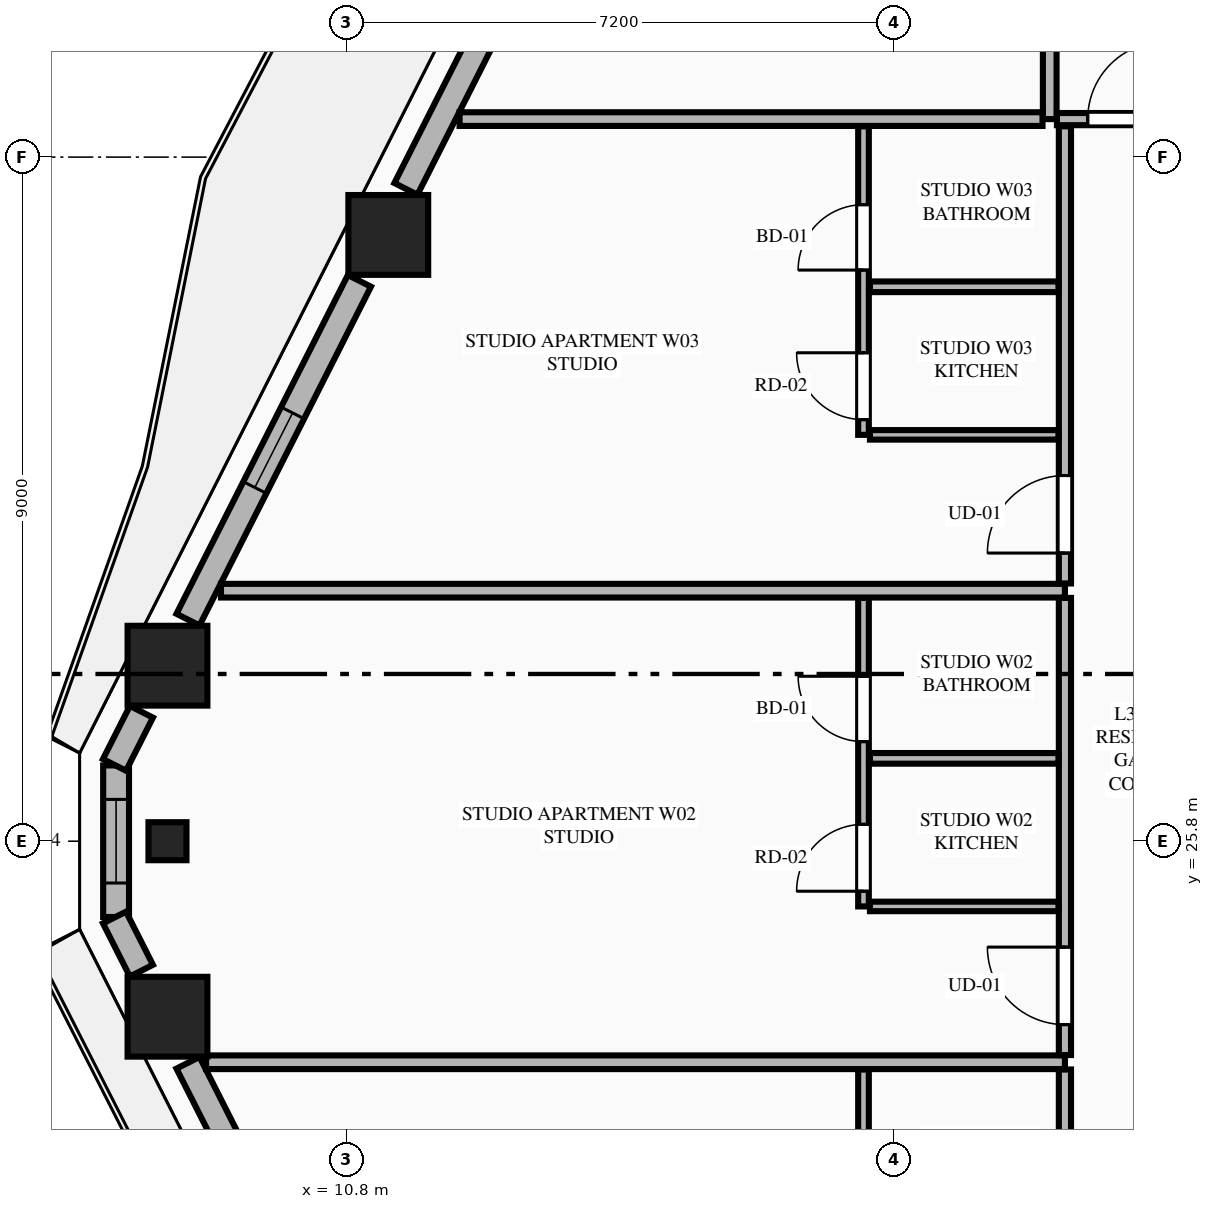
"""IFC4 building model, lengths in metres.
Left out: names, types, materials, properties, quantities, classifications, styles, units other than length and angle.
Written with IfcOpenShell. Run it as: python <this file> out.ifc"""

import sys

from ifc_helpers import new_model, si_unit, direction, frame, frame_2d, origin, origin_2d, place, context, subcontext, project, spatial, rectangle, extrude, element, fill, save


model = new_model("IFC4")
c1 = context("Model", 3, precision=1e-05, world=origin(), true_north=direction((0.0, 1.0)))
c2 = subcontext(c1, "Body", "Model", "MODEL_VIEW")
j1 = project(units=[si_unit("LENGTHUNIT", "METRE"), si_unit("PLANEANGLEUNIT", "RADIAN")], contexts=[c1])
p1 = place(None, origin())
s1 = spatial("IfcSite", under=j1, at=p1, CompositionType="ELEMENT")
p2 = place(p1, origin())
s2 = spatial("IfcBuilding", under=s1, at=p2, CompositionType="ELEMENT")
p3 = place(p2, frame((0.0, 0.0, 123.25)))
s3 = spatial("IfcBuildingStorey", under=s2, at=p3, CompositionType="ELEMENT", Elevation=123.25)
for number, where, z_axis, x_axis in (
    (1, (11.348, 33.776, 0.0), (0.0, 0.0, 1.0), (1.0, 0.0, 0.0)),
    (2, (8.443, 28.109, 0.0), (0.0, 0.0, 1.0), (1.0, 0.0, 0.0)),
    (3, (8.443, 23.491, 0.0), (0.0, 0.0, 1.0), (1.0, 0.0, 0.0)),
):
    element("IfcColumn", number, at=place(p3, frame(where, z_axis=z_axis, x_axis=x_axis)), inside=s3, PredefinedType="COLUMN", context=c2, shape_type="SweptSolid", body=[
        extrude(rectangle(XDim=1.05, YDim=1.05, at=origin_2d()), origin(), (0.0, 0.0, 1.0), 3.55),
    ])
p4 = place(p3, frame((8.443, 25.8, 0.0), z_axis=(0.0, 0.0, 1.0), x_axis=(0.0, -1.0, 0.0)))
e4 = element("IfcColumn", 4, at=p4, inside=s3, PredefinedType="PILASTER", context=c2, shape_type="SweptSolid", body=[
    extrude(rectangle(XDim=0.5, YDim=0.35, at=origin_2d()), origin(), (0.0, 0.0, 1.0), 3.55),
])
p5 = place(p3, frame((7.767, 26.797, 0.0), z_axis=(0.0, 0.0, 1.0), x_axis=(0.0, -1.0, 0.0)))
e5 = element("IfcWall", 5, at=p5, inside=s3, PredefinedType="STANDARD", context=c2, shape_type="SweptSolid", body=[
    extrude(rectangle(XDim=1.994, YDim=0.34, at=frame_2d((0.997, 0.0))), origin(), (0.0, 0.0, 1.0), 3.34),
])
p6 = place(p5, frame((0.447, 0.0, 0.75)))
e6 = element("IfcOpeningElement", 6, at=p6, cuts=e5, PredefinedType="OPENING", context=c2, shape_type="SweptSolid", body=[
    extrude(rectangle(XDim=1.1, YDim=2.0, at=frame_2d((0.55, 1.0))), frame((0.0, 0.18, 0.0), z_axis=(0.0, -1.0, 0.0), x_axis=(1.0, 0.0, 0.0)), (0.0, 0.0, 1.0), 0.36),
])
p7 = place(p3, frame((13.937, 39.039, 0.0), z_axis=(0.0, 0.0, 1.0), x_axis=(-0.451567731634, -0.892236842855, 0.0)))
e7 = element("IfcWall", 7, at=p7, inside=s3, PredefinedType="STANDARD", context=c2, shape_type="SweptSolid", body=[
    extrude(rectangle(XDim=5.219, YDim=0.34, at=frame_2d((2.61, 0.0))), origin(), (0.0, 0.0, 1.0), 2.797),
])
p8 = place(p7, frame((1.42, 0.0, 0.0)))
e8 = element("IfcOpeningElement", 8, at=p8, cuts=e7, PredefinedType="OPENING", context=c2, shape_type="SweptSolid", body=[
    extrude(rectangle(XDim=1.1, YDim=2.25, at=frame_2d((0.55, 1.125))), frame((0.0, 0.18, 0.0), z_axis=(0.0, -1.0, 0.0), x_axis=(1.0, 0.0, 0.0)), (0.0, 0.0, 1.0), 0.36),
])
p9 = place(p3, frame((10.968, 33.172, 0.0), z_axis=(0.0, 0.0, 1.0), x_axis=(-0.451470533039, -0.892286029139, 0.0)))
e9 = element("IfcWall", 9, at=p9, inside=s3, PredefinedType="STANDARD", context=c2, shape_type="SweptSolid", body=[
    extrude(rectangle(XDim=4.995, YDim=0.34, at=frame_2d((2.498, 0.0))), origin(), (0.0, 0.0, 1.0), 2.797),
])
p10 = place(p9, frame((1.947, 0.0, 0.75)))
e10 = element("IfcOpeningElement", 10, at=p10, cuts=e9, PredefinedType="OPENING", context=c2, shape_type="SweptSolid", body=[
    extrude(rectangle(XDim=1.1, YDim=1.897, at=frame_2d((0.55, 0.948))), frame((0.0, 0.18, 0.0), z_axis=(0.0, -1.0, 0.0), x_axis=(1.0, 0.0, 0.0)), (0.0, 0.0, 1.0), 0.36),
])
for number, where, z_axis, x_axis in (
    (11, (8.1, 27.503, 0.0), (0.0, 0.0, 1.0), (-0.452, -0.892, 0.0)),
    (12, (7.746, 24.796, 0.0), (0.0, 0.0, 1.0), (0.452, -0.892, 0.0)),
):
    element("IfcWall", number, at=place(p3, frame(where, z_axis=z_axis, x_axis=x_axis)), inside=s3, PredefinedType="STANDARD", context=c2, shape_type="SweptSolid", body=[
        extrude(rectangle(XDim=0.783, YDim=0.34, at=frame_2d((0.392, 0.0))), origin(), (0.0, 0.0, 1.0), 3.34),
    ])
p11 = place(p3, frame((8.713, 22.885, 0.0), z_axis=(0.0, 0.0, 1.0), x_axis=(0.451470533039, -0.892286029139, 0.0)))
e13 = element("IfcWall", 13, at=p11, inside=s3, PredefinedType="STANDARD", context=c2, shape_type="SweptSolid", body=[
    extrude(rectangle(XDim=4.995, YDim=0.34, at=frame_2d((2.498, 0.0))), origin(), (0.0, 0.0, 1.0), 2.797),
])
p12 = place(p11, frame((1.947, 0.0, 0.75)))
e14 = element("IfcOpeningElement", 14, at=p12, cuts=e13, PredefinedType="OPENING", context=c2, shape_type="SweptSolid", body=[
    extrude(rectangle(XDim=1.1, YDim=1.897, at=frame_2d((0.55, 0.948))), frame((0.0, 0.18, 0.0), z_axis=(0.0, -1.0, 0.0), x_axis=(1.0, 0.0, 0.0)), (0.0, 0.0, 1.0), 0.36),
])
p13 = place(p3, frame((20.05, 35.3, 0.0), z_axis=(0.0, 0.0, 1.0), x_axis=(0.0, 1.0, 0.0)))
e15 = element("IfcWall", 15, at=p13, inside=s3, PredefinedType="PARTITIONING", context=c2, shape_type="SweptSolid", body=[
    extrude(rectangle(XDim=12.195, YDim=0.18, at=frame_2d((6.098, 0.0))), origin(), (0.0, 0.0, 1.0), 3.34),
])
p14 = place(p3, frame((20.145, 35.3, 0.0), z_axis=(0.0, 0.0, 1.0), x_axis=(1.0, 0.0, 0.0)))
e16 = element("IfcWall", 16, at=p14, inside=s3, PredefinedType="PARTITIONING", context=c2, shape_type="SweptSolid", body=[
    extrude(rectangle(XDim=24.51, YDim=0.16, at=frame_2d((12.255, 0.0))), origin(), (0.0, 0.0, 1.0), 3.34),
])
p15 = place(p14, frame((0.405, 0.0, 0.0)))
e17 = element("IfcOpeningElement", 17, at=p15, cuts=e16, PredefinedType="OPENING", context=c2, shape_type="SweptSolid", body=[
    extrude(rectangle(XDim=1.02, YDim=2.25, at=frame_2d((0.51, 1.125))), frame((0.0, 0.09, 0.0), z_axis=(0.0, -1.0, 0.0), x_axis=(1.0, 0.0, 0.0)), (0.0, 0.0, 1.0), 0.18),
])
p16 = place(p3, frame((12.286, 35.3, 0.0), z_axis=(0.0, 0.0, 1.0), x_axis=(1.0, 0.0, 0.0)))
e18 = element("IfcWall", 18, at=p16, inside=s3, PredefinedType="PARTITIONING", context=c2, shape_type="SweptSolid", body=[
    extrude(rectangle(XDim=7.669, YDim=0.18, at=frame_2d((3.834, 0.0))), origin(), (0.0, 0.0, 1.0), 3.34),
])
p17 = place(p3, frame((20.25, 16.595, 0.0), z_axis=(0.0, 0.0, 1.0), x_axis=(0.0, 1.0, 0.0)))
e19 = element("IfcWall", 19, at=p17, inside=s3, PredefinedType="PARTITIONING", context=c2, shape_type="SweptSolid", body=[
    extrude(rectangle(XDim=6.202, YDim=0.16, at=frame_2d((3.101, 0.0))), origin(), (0.0, 0.0, 1.0), 3.34),
])
p18 = place(p17, frame((0.4, 0.0, 0.0)))
e20 = element("IfcOpeningElement", 20, at=p18, cuts=e19, PredefinedType="OPENING", context=c2, shape_type="SweptSolid", body=[
    extrude(rectangle(XDim=1.02, YDim=2.25, at=frame_2d((0.51, 1.125))), frame((0.0, 0.09, 0.0), z_axis=(0.0, -1.0, 0.0), x_axis=(1.0, 0.0, 0.0)), (0.0, 0.0, 1.0), 0.18),
])
p19 = place(p3, frame((17.6, 18.55, 0.0), z_axis=(0.0, 0.0, 1.0), x_axis=(0.0, 1.0, 0.0)))
e21 = element("IfcWall", 21, at=p19, inside=s3, PredefinedType="PLUMBINGWALL", context=c2, shape_type="SweptSolid", body=[
    extrude(rectangle(XDim=4.247, YDim=0.14, at=frame_2d((2.124, 0.0))), origin(), (0.0, 0.0, 1.0), 3.34),
])
p20 = place(p19, frame((2.259, 0.0, 0.0)))
e22 = element("IfcOpeningElement", 22, at=p20, cuts=e21, PredefinedType="OPENING", context=c2, shape_type="SweptSolid", body=[
    extrude(rectangle(XDim=0.86, YDim=2.1, at=frame_2d((0.43, 1.05))), frame((0.0, 0.08, 0.0), z_axis=(0.0, -1.0, 0.0), x_axis=(1.0, 0.0, 0.0)), (0.0, 0.0, 1.0), 0.16),
])
p21 = place(p19, frame((0.2, 0.0, 0.0)))
e23 = element("IfcOpeningElement", 23, at=p21, cuts=e21, PredefinedType="OPENING", context=c2, shape_type="SweptSolid", body=[
    extrude(rectangle(XDim=0.88, YDim=2.15, at=frame_2d((0.44, 1.075))), frame((0.0, 0.08, 0.0), z_axis=(0.0, -1.0, 0.0), x_axis=(1.0, 0.0, 0.0)), (0.0, 0.0, 1.0), 0.16),
])
p22 = place(p3, frame((8.951, 22.892, 0.0), z_axis=(0.0, 0.0, 1.0), x_axis=(1.0, 0.0, 0.0)))
e24 = element("IfcWall", 24, at=p22, inside=s3, PredefinedType="PARTITIONING", context=c2, shape_type="SweptSolid", body=[
    extrude(rectangle(XDim=11.299, YDim=0.18, at=frame_2d((5.649, 0.0))), origin(), (0.0, 0.0, 1.0), 3.34),
])
p23 = place(p3, frame((20.25, 22.987, 0.0), z_axis=(0.0, 0.0, 1.0), x_axis=(0.0, 1.0, 0.0)))
e25 = element("IfcWall", 25, at=p23, inside=s3, PredefinedType="PARTITIONING", context=c2, shape_type="SweptSolid", body=[
    extrude(rectangle(XDim=6.014, YDim=0.16, at=frame_2d((3.007, 0.0))), origin(), (0.0, 0.0, 1.0), 3.34),
])
p24 = place(p23, frame((0.4, 0.0, 0.0)))
e26 = element("IfcOpeningElement", 26, at=p24, cuts=e25, PredefinedType="OPENING", context=c2, shape_type="SweptSolid", body=[
    extrude(rectangle(XDim=1.02, YDim=2.25, at=frame_2d((0.51, 1.125))), frame((0.0, 0.09, 0.0), z_axis=(0.0, -1.0, 0.0), x_axis=(1.0, 0.0, 0.0)), (0.0, 0.0, 1.0), 0.18),
])
p25 = place(p3, frame((17.685, 24.942, 0.0), z_axis=(0.0, 0.0, 1.0), x_axis=(1.0, 0.0, 0.0)))
e27 = element("IfcWall", 27, at=p25, inside=s3, PredefinedType="PARTITIONING", context=c2, shape_type="SweptSolid", body=[
    extrude(rectangle(XDim=2.48, YDim=0.125, at=frame_2d((1.24, 0.0))), origin(), (0.0, 0.0, 1.0), 3.34),
])
p26 = place(p3, frame((17.6, 24.942, 0.0), z_axis=(0.0, 0.0, 1.0), x_axis=(0.0, 1.0, 0.0)))
e28 = element("IfcWall", 28, at=p26, inside=s3, PredefinedType="PLUMBINGWALL", context=c2, shape_type="SweptSolid", body=[
    extrude(rectangle(XDim=4.059, YDim=0.14, at=frame_2d((2.03, 0.0))), origin(), (0.0, 0.0, 1.0), 3.34),
])
p27 = place(p26, frame((2.168, 0.0, 0.0)))
e29 = element("IfcOpeningElement", 29, at=p27, cuts=e28, PredefinedType="OPENING", context=c2, shape_type="SweptSolid", body=[
    extrude(rectangle(XDim=0.86, YDim=2.1, at=frame_2d((0.43, 1.05))), frame((0.0, 0.08, 0.0), z_axis=(0.0, -1.0, 0.0), x_axis=(1.0, 0.0, 0.0)), (0.0, 0.0, 1.0), 0.16),
])
p28 = place(p26, frame((0.2, 0.0, 0.0)))
e30 = element("IfcOpeningElement", 30, at=p28, cuts=e28, PredefinedType="OPENING", context=c2, shape_type="SweptSolid", body=[
    extrude(rectangle(XDim=0.88, YDim=2.15, at=frame_2d((0.44, 1.075))), frame((0.0, 0.08, 0.0), z_axis=(0.0, -1.0, 0.0), x_axis=(1.0, 0.0, 0.0)), (0.0, 0.0, 1.0), 0.16),
])
p29 = place(p3, frame((17.685, 26.89, 0.0), z_axis=(0.0, 0.0, 1.0), x_axis=(1.0, 0.0, 0.0)))
e31 = element("IfcWall", 31, at=p29, inside=s3, PredefinedType="PLUMBINGWALL", context=c2, shape_type="SweptSolid", body=[
    extrude(rectangle(XDim=2.48, YDim=0.14, at=frame_2d((1.24, 0.0))), origin(), (0.0, 0.0, 1.0), 3.34),
])
p30 = place(p3, frame((9.147, 29.096, 0.0), z_axis=(0.0, 0.0, 1.0), x_axis=(1.0, 0.0, 0.0)))
e32 = element("IfcWall", 32, at=p30, inside=s3, PredefinedType="PARTITIONING", context=c2, shape_type="SweptSolid", body=[
    extrude(rectangle(XDim=11.103, YDim=0.18, at=frame_2d((5.552, 0.0))), origin(), (0.0, 0.0, 1.0), 3.34),
])
p31 = place(p3, frame((20.25, 29.191, 0.0), z_axis=(0.0, 0.0, 1.0), x_axis=(0.0, 1.0, 0.0)))
e33 = element("IfcWall", 33, at=p31, inside=s3, PredefinedType="PARTITIONING", context=c2, shape_type="SweptSolid", body=[
    extrude(rectangle(XDim=6.014, YDim=0.16, at=frame_2d((3.007, 0.0))), origin(), (0.0, 0.0, 1.0), 3.34),
])
p32 = place(p31, frame((0.4, 0.0, 0.0)))
e34 = element("IfcOpeningElement", 34, at=p32, cuts=e33, PredefinedType="OPENING", context=c2, shape_type="SweptSolid", body=[
    extrude(rectangle(XDim=1.02, YDim=2.25, at=frame_2d((0.51, 1.125))), frame((0.0, 0.09, 0.0), z_axis=(0.0, -1.0, 0.0), x_axis=(1.0, 0.0, 0.0)), (0.0, 0.0, 1.0), 0.18),
])
p33 = place(p3, frame((17.685, 31.146, 0.0), z_axis=(0.0, 0.0, 1.0), x_axis=(1.0, 0.0, 0.0)))
e35 = element("IfcWall", 35, at=p33, inside=s3, PredefinedType="PARTITIONING", context=c2, shape_type="SweptSolid", body=[
    extrude(rectangle(XDim=2.48, YDim=0.125, at=frame_2d((1.24, 0.0))), origin(), (0.0, 0.0, 1.0), 3.34),
])
p34 = place(p3, frame((17.6, 31.146, 0.0), z_axis=(0.0, 0.0, 1.0), x_axis=(0.0, 1.0, 0.0)))
e36 = element("IfcWall", 36, at=p34, inside=s3, PredefinedType="PLUMBINGWALL", context=c2, shape_type="SweptSolid", body=[
    extrude(rectangle(XDim=4.059, YDim=0.14, at=frame_2d((2.03, 0.0))), origin(), (0.0, 0.0, 1.0), 3.34),
])
p35 = place(p34, frame((2.168, 0.0, 0.0)))
e37 = element("IfcOpeningElement", 37, at=p35, cuts=e36, PredefinedType="OPENING", context=c2, shape_type="SweptSolid", body=[
    extrude(rectangle(XDim=0.86, YDim=2.1, at=frame_2d((0.43, 1.05))), frame((0.0, 0.08, 0.0), z_axis=(0.0, -1.0, 0.0), x_axis=(1.0, 0.0, 0.0)), (0.0, 0.0, 1.0), 0.16),
])
p36 = place(p34, frame((0.2, 0.0, 0.0)))
e38 = element("IfcOpeningElement", 38, at=p36, cuts=e36, PredefinedType="OPENING", context=c2, shape_type="SweptSolid", body=[
    extrude(rectangle(XDim=0.88, YDim=2.15, at=frame_2d((0.44, 1.075))), frame((0.0, 0.08, 0.0), z_axis=(0.0, -1.0, 0.0), x_axis=(1.0, 0.0, 0.0)), (0.0, 0.0, 1.0), 0.16),
])
p37 = place(p3, frame((17.685, 33.094, 0.0), z_axis=(0.0, 0.0, 1.0), x_axis=(1.0, 0.0, 0.0)))
e39 = element("IfcWall", 39, at=p37, inside=s3, PredefinedType="PLUMBINGWALL", context=c2, shape_type="SweptSolid", body=[
    extrude(rectangle(XDim=2.48, YDim=0.14, at=frame_2d((1.24, 0.0))), origin(), (0.0, 0.0, 1.0), 3.34),
])
p38 = place(p10, origin())
e40 = element("IfcWindow", 40, at=p38, inside=s3, PartitioningType="SINGLE_PANEL", PredefinedType="WINDOW", context=c2, shape_type="SweptSolid", body=[
    extrude(rectangle(XDim=1.1, YDim=1.897, at=frame_2d((0.55, 0.948))), frame((0.0, 0.03, 0.0), z_axis=(0.0, -1.0, 0.0), x_axis=(1.0, 0.0, 0.0)), (0.0, 0.0, 1.0), 0.06),
])
fill(e10, e40)
p39 = place(p15, origin())
e41 = element("IfcDoor", 41, at=p39, inside=s3, OperationType="SINGLE_SWING_RIGHT", PredefinedType="DOOR", context=c2, shape_type="SweptSolid", body=[
    extrude(rectangle(XDim=1.02, YDim=2.25, at=frame_2d((0.51, 1.125))), frame((0.0, 0.025, 0.0), z_axis=(0.0, -1.0, 0.0), x_axis=(1.0, 0.0, 0.0)), (0.0, 0.0, 1.0), 0.05),
])
fill(e17, e41)
p40 = place(p27, origin())
e42 = element("IfcDoor", 42, at=p40, inside=s3, OperationType="SINGLE_SWING_RIGHT", PredefinedType="DOOR", context=c2, shape_type="SweptSolid", body=[
    extrude(rectangle(XDim=0.86, YDim=2.1, at=frame_2d((0.43, 1.05))), frame((0.0, 0.025, 0.0), z_axis=(0.0, -1.0, 0.0), x_axis=(1.0, 0.0, 0.0)), (0.0, 0.0, 1.0), 0.05),
])
fill(e29, e42)
p41 = place(p24, origin())
e43 = element("IfcDoor", 43, at=p41, inside=s3, OperationType="SINGLE_SWING_RIGHT", PredefinedType="DOOR", context=c2, shape_type="SweptSolid", body=[
    extrude(rectangle(XDim=1.02, YDim=2.25, at=frame_2d((0.51, 1.125))), frame((0.0, 0.025, 0.0), z_axis=(0.0, -1.0, 0.0), x_axis=(1.0, 0.0, 0.0)), (0.0, 0.0, 1.0), 0.05),
])
fill(e26, e43)
p42 = place(p28, origin())
e44 = element("IfcDoor", 44, at=p42, inside=s3, OperationType="SINGLE_SWING_LEFT", PredefinedType="DOOR", context=c2, shape_type="SweptSolid", body=[
    extrude(rectangle(XDim=0.88, YDim=2.15, at=frame_2d((0.44, 1.075))), frame((0.0, 0.025, 0.0), z_axis=(0.0, -1.0, 0.0), x_axis=(1.0, 0.0, 0.0)), (0.0, 0.0, 1.0), 0.05),
])
fill(e30, e44)
p43 = place(p35, origin())
e45 = element("IfcDoor", 45, at=p43, inside=s3, OperationType="SINGLE_SWING_LEFT", PredefinedType="DOOR", context=c2, shape_type="SweptSolid", body=[
    extrude(rectangle(XDim=0.86, YDim=2.1, at=frame_2d((0.43, 1.05))), frame((0.0, 0.025, 0.0), z_axis=(0.0, -1.0, 0.0), x_axis=(1.0, 0.0, 0.0)), (0.0, 0.0, 1.0), 0.05),
])
fill(e37, e45)
p44 = place(p32, origin())
e46 = element("IfcDoor", 46, at=p44, inside=s3, OperationType="SINGLE_SWING_LEFT", PredefinedType="DOOR", context=c2, shape_type="SweptSolid", body=[
    extrude(rectangle(XDim=1.02, YDim=2.25, at=frame_2d((0.51, 1.125))), frame((0.0, 0.025, 0.0), z_axis=(0.0, -1.0, 0.0), x_axis=(1.0, 0.0, 0.0)), (0.0, 0.0, 1.0), 0.05),
])
fill(e34, e46)
p45 = place(p36, origin())
e47 = element("IfcDoor", 47, at=p45, inside=s3, OperationType="SINGLE_SWING_RIGHT", PredefinedType="DOOR", context=c2, shape_type="SweptSolid", body=[
    extrude(rectangle(XDim=0.88, YDim=2.15, at=frame_2d((0.44, 1.075))), frame((0.0, 0.025, 0.0), z_axis=(0.0, -1.0, 0.0), x_axis=(1.0, 0.0, 0.0)), (0.0, 0.0, 1.0), 0.05),
])
fill(e38, e47)
p46 = place(p6, origin())
e48 = element("IfcWindow", 48, at=p46, inside=s3, PartitioningType="SINGLE_PANEL", PredefinedType="WINDOW", context=c2, shape_type="SweptSolid", body=[
    extrude(rectangle(XDim=1.1, YDim=2.0, at=frame_2d((0.55, 1.0))), frame((0.0, 0.03, 0.0), z_axis=(0.0, -1.0, 0.0), x_axis=(1.0, 0.0, 0.0)), (0.0, 0.0, 1.0), 0.06),
])
fill(e6, e48)
save(model, sys.argv[1])
